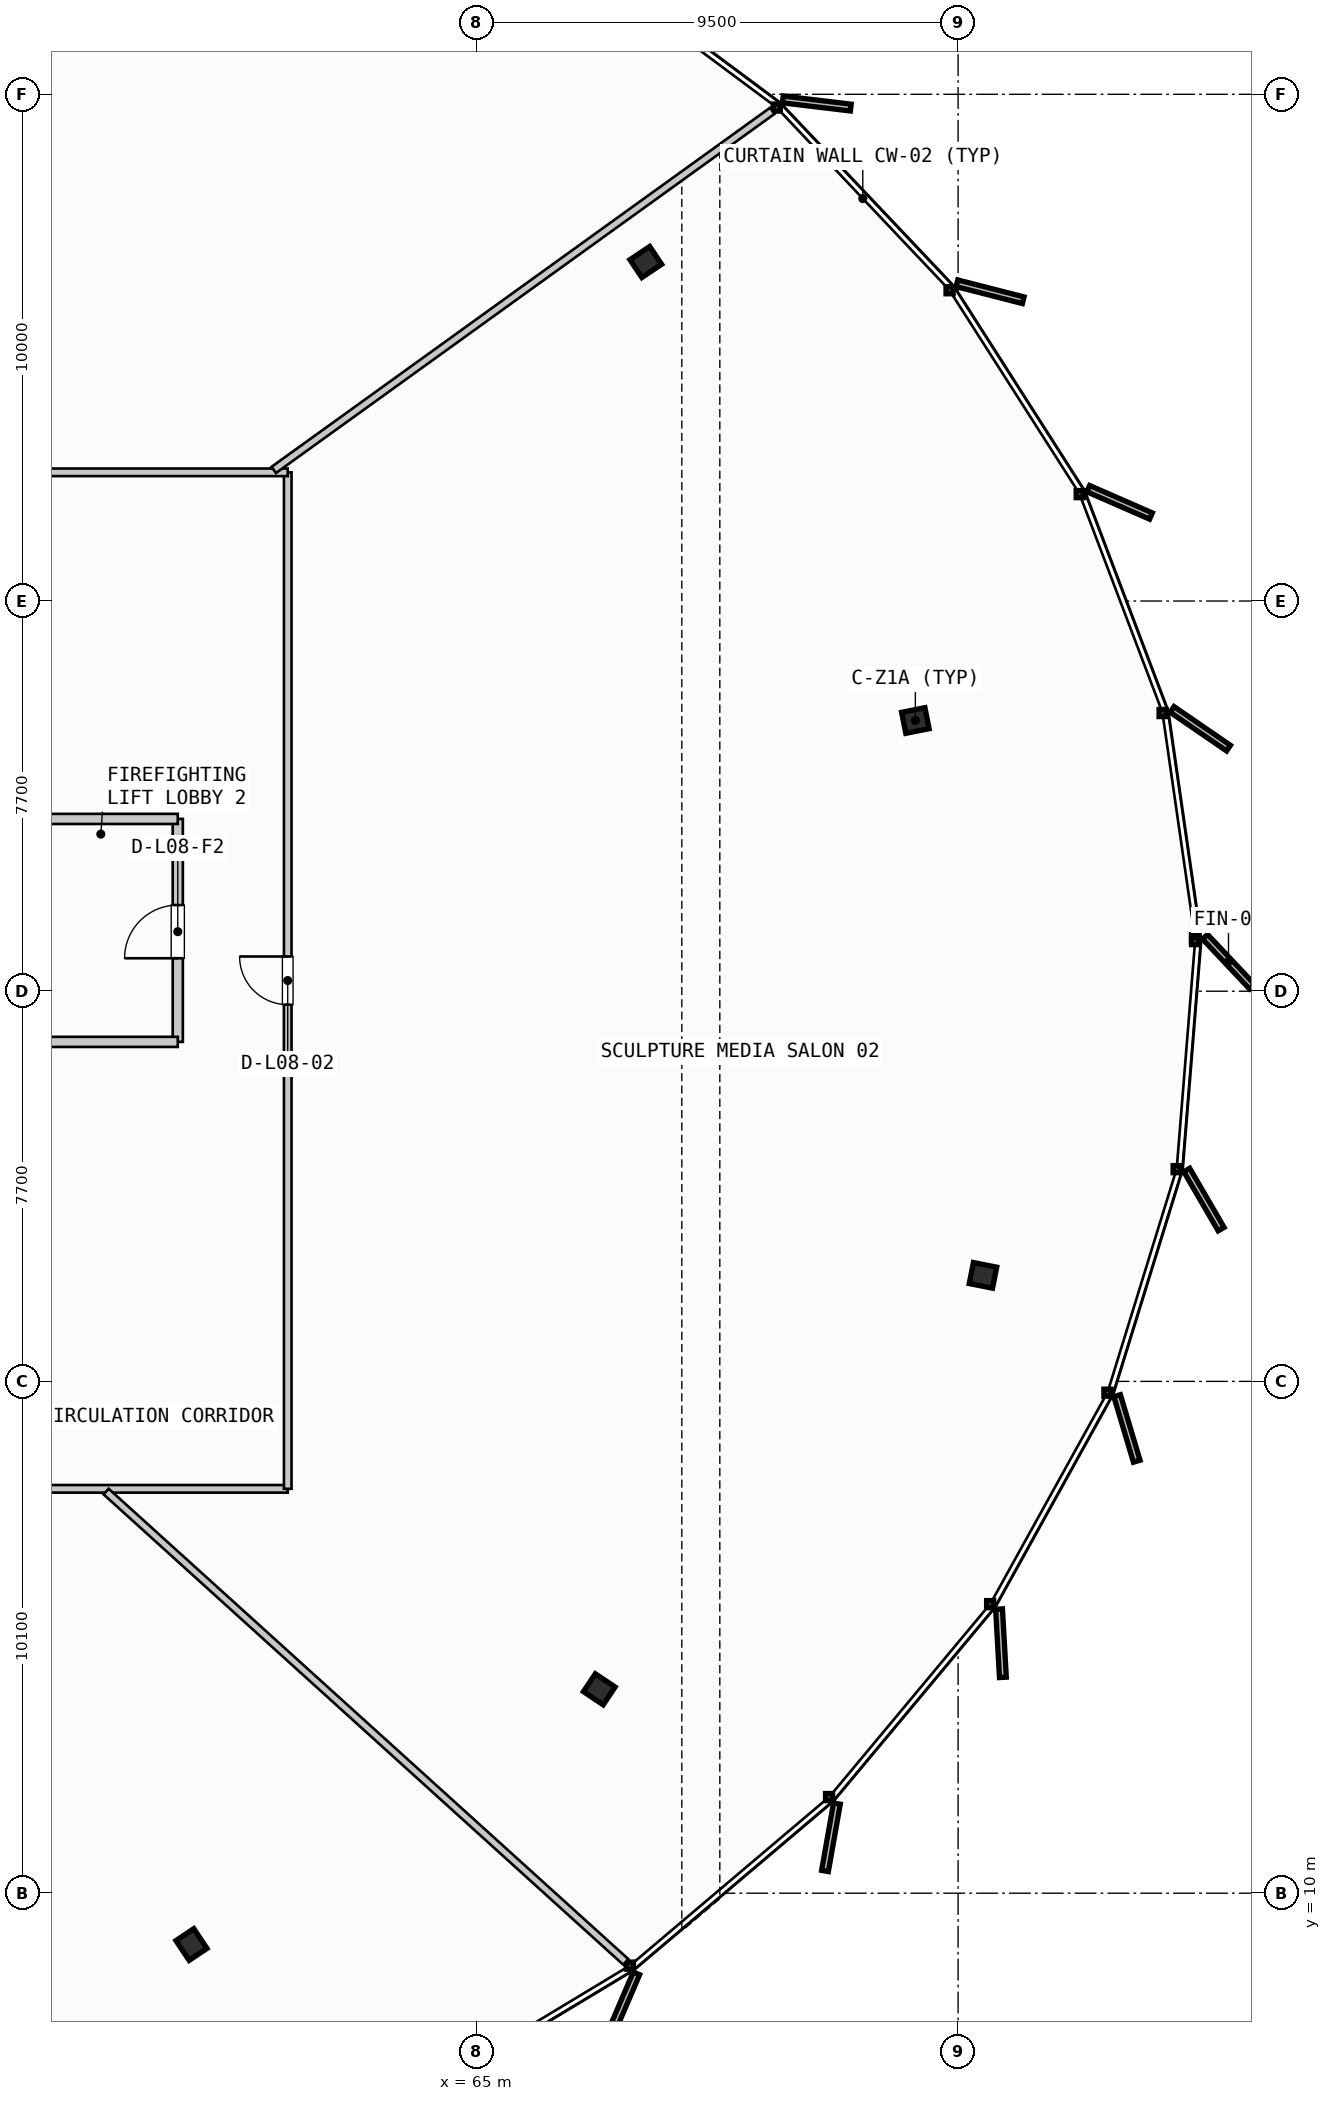
"""IFC4 building model, lengths in metres.
Left out: names, types, materials, properties, quantities, classifications, styles, units other than length and angle.
Written with IfcOpenShell. Run it as: python <this file> out.ifc"""

import sys

from ifc_helpers import new_model, si_unit, direction, frame, frame_2d, origin, origin_2d, place, context, subcontext, project, spatial, rectangle, i_section, extrude, source, transform, mapped, element, fill, save


model = new_model("IFC4")
c1 = context("Model", 3, precision=1e-05, world=origin(), true_north=direction((0.0, 1.0)))
c2 = subcontext(c1, "Body", "Model", "MODEL_VIEW")
j1 = project(units=[si_unit("LENGTHUNIT", "METRE"), si_unit("PLANEANGLEUNIT", "RADIAN")], contexts=[c1])
p1 = place(None, origin())
s1 = spatial("IfcSite", under=j1, at=p1, CompositionType="ELEMENT")
p2 = place(p1, origin())
s2 = spatial("IfcBuilding", under=s1, at=p2, CompositionType="ELEMENT")
p3 = place(p2, frame((0.0, 0.0, 37.2)))
s3 = spatial("IfcBuildingStorey", under=s2, at=p3, CompositionType="ELEMENT", Elevation=37.2)
m1 = source(origin(), c2, "Body", "SweptSolid", [
    extrude(i_section(OverallWidth=0.423, OverallDepth=0.469, WebThickness=0.051, FlangeThickness=0.081, FilletRadius=0.015, at=origin_2d()), origin(), (0.0, 0.0, 1.0), 3.55),
])
for number, where, z_axis, x_axis in (
    (1, (73.657, 33.142, 0.0), (0.0, 0.0, 1.0), (0.981, 0.195, 0.0)),
    (2, (68.336, 42.19, 0.0), (0.0, 0.0, 1.0), (0.831, 0.556, 0.0)),
    (3, (59.37, 8.987, 0.0), (0.0, 0.0, 1.0), (0.556, -0.831, 0.0)),
    (4, (67.418, 14.023, 0.0), (0.0, 0.0, 1.0), (0.831, -0.556, 0.0)),
    (5, (74.991, 22.192, 0.0), (0.0, 0.0, 1.0), (0.981, -0.195, 0.0)),
):
    element("IfcColumn", number, at=place(p3, frame(where, z_axis=z_axis, x_axis=x_axis)), inside=s3, PredefinedType="COLUMN", context=c2, shape_type="MappedRepresentation", body=[
        mapped(m1, transform((0.0, 0.0, 0.0), scale=1.0)),
    ])
p4 = place(p3, frame((59.1, 26.8, 0.0), z_axis=(0.0, 0.0, 1.0), x_axis=(0.0, 1.0, 0.0)))
e6 = element("IfcWall", 6, at=p4, inside=s3, PredefinedType="PARTITIONING", context=c2, shape_type="SweptSolid", body=[
    extrude(rectangle(XDim=4.4, YDim=0.2, at=frame_2d((2.2, 0.0))), origin(), (0.0, 0.0, 1.0), 2.925),
])
p5 = place(p4, frame((1.65, 0.0, 0.0)))
e7 = element("IfcOpeningElement", 7, at=p5, cuts=e6, PredefinedType="OPENING", context=c2, shape_type="SweptSolid", body=[
    extrude(rectangle(XDim=1.05, YDim=2.15, at=frame_2d((0.525, 1.075))), frame((0.0, 0.11, 0.0), z_axis=(0.0, -1.0, 0.0), x_axis=(1.0, 0.0, 0.0)), (0.0, 0.0, 1.0), 0.22),
])
for number, where, z_axis, x_axis in (
    (8, (55.96, 26.8, 0.0), (0.0, 0.0, 1.0), (1.0, 0.0, 0.0)),
    (9, (55.96, 31.2, 0.0), (0.0, 0.0, 1.0), (1.0, 0.0, 0.0)),
):
    element("IfcWall", number, at=place(p3, frame(where, z_axis=z_axis, x_axis=x_axis)), inside=s3, PredefinedType="PARTITIONING", context=c2, shape_type="SweptSolid", body=[
        extrude(rectangle(XDim=3.14, YDim=0.2, at=frame_2d((1.57, 0.0))), origin(), (0.0, 0.0, 1.0), 2.925),
    ])
p6 = place(p3, frame((32.85, 17.98, 0.0), z_axis=(0.0, 0.0, 1.0), x_axis=(1.0, 0.0, 0.0)))
e10 = element("IfcWall", 10, at=p6, inside=s3, PredefinedType="PARTITIONING", context=c2, shape_type="SweptSolid", body=[
    extrude(rectangle(XDim=28.42, YDim=0.15, at=frame_2d((14.21, 0.0))), origin(), (0.0, 0.0, 1.0), 2.925),
])
p7 = place(p6, frame((12.271, 0.0, 0.0)))
e11 = element("IfcOpeningElement", 11, at=p7, cuts=e10, PredefinedType="OPENING", context=c2, shape_type="SweptSolid", body=[
    extrude(rectangle(XDim=0.95, YDim=2.15, at=frame_2d((0.475, 1.075))), frame((0.0, 0.085, 0.0), z_axis=(0.0, -1.0, 0.0), x_axis=(1.0, 0.0, 0.0)), (0.0, 0.0, 1.0), 0.17),
])
p8 = place(p3, frame((61.27, 17.98, 0.0), z_axis=(0.0, 0.0, 1.0), x_axis=(0.0, 1.0, 0.0)))
e12 = element("IfcWall", 12, at=p8, inside=s3, PredefinedType="PARTITIONING", context=c2, shape_type="SweptSolid", body=[
    extrude(rectangle(XDim=20.06, YDim=0.15, at=frame_2d((10.03, 0.0))), origin(), (0.0, 0.0, 1.0), 2.925),
])
p9 = place(p8, frame((9.555, 0.0, 0.0)))
e13 = element("IfcOpeningElement", 13, at=p9, cuts=e12, PredefinedType="OPENING", context=c2, shape_type="SweptSolid", body=[
    extrude(rectangle(XDim=0.95, YDim=2.15, at=frame_2d((0.475, 1.075))), frame((0.0, 0.085, 0.0), z_axis=(0.0, -1.0, 0.0), x_axis=(1.0, 0.0, 0.0)), (0.0, 0.0, 1.0), 0.17),
])
p10 = place(p3, frame((61.27, 38.04, 0.0), z_axis=(0.0, 0.0, 1.0), x_axis=(-1.0, 0.0, 0.0)))
e14 = element("IfcWall", 14, at=p10, inside=s3, PredefinedType="PARTITIONING", context=c2, shape_type="SweptSolid", body=[
    extrude(rectangle(XDim=28.42, YDim=0.15, at=frame_2d((14.21, 0.0))), origin(), (0.0, 0.0, 1.0), 2.925),
])
p11 = place(p10, frame((12.698, 0.0, 0.0)))
e15 = element("IfcOpeningElement", 15, at=p11, cuts=e14, PredefinedType="OPENING", context=c2, shape_type="SweptSolid", body=[
    extrude(rectangle(XDim=0.95, YDim=2.15, at=frame_2d((0.475, 1.075))), frame((0.0, 0.085, 0.0), z_axis=(0.0, -1.0, 0.0), x_axis=(1.0, 0.0, 0.0)), (0.0, 0.0, 1.0), 0.17),
])
p12 = place(p3, frame((57.686, 17.926, 0.0), z_axis=(0.0, 0.0, 1.0), x_axis=(0.741441271634, -0.67101776483, 0.0)))
e16 = element("IfcWall", 16, at=p12, inside=s3, PredefinedType="PARTITIONING", context=c2, shape_type="SweptSolid", body=[
    extrude(rectangle(XDim=13.832, YDim=0.15, at=frame_2d((6.916, 0.0))), origin(), (0.0, 0.0, 1.0), 2.925),
])
p13 = place(p3, frame((60.994, 38.087, 0.0), z_axis=(0.0, 0.0, 1.0), x_axis=(0.811422427455, 0.584460130567, 0.0)))
e17 = element("IfcWall", 17, at=p13, inside=s3, PredefinedType="PARTITIONING", context=c2, shape_type="SweptSolid", body=[
    extrude(rectangle(XDim=12.125, YDim=0.15, at=frame_2d((6.062, 0.0))), origin(), (0.0, 0.0, 1.0), 2.925),
])
m2 = source(origin(), c2, "Body", "SweptSolid", [
    extrude(rectangle(XDim=1.05, YDim=2.15, at=frame_2d((0.525, 1.075))), frame((0.0, 0.025, 0.0), z_axis=(0.0, -1.0, 0.0), x_axis=(1.0, 0.0, 0.0)), (0.0, 0.0, 1.0), 0.05),
])
p14 = place(p5, origin())
e18 = element("IfcDoor", 18, at=p14, inside=s3, OperationType="SINGLE_SWING_LEFT", PredefinedType="DOOR", context=c2, shape_type="MappedRepresentation", body=[
    mapped(m2, transform((0.0, 0.0, 0.0), scale=1.0)),
])
fill(e7, e18)
m3 = source(origin(), c2, "Body", "SweptSolid", [
    extrude(rectangle(XDim=0.95, YDim=2.15, at=frame_2d((0.475, 1.075))), frame((0.0, 0.025, 0.0), z_axis=(0.0, -1.0, 0.0), x_axis=(1.0, 0.0, 0.0)), (0.0, 0.0, 1.0), 0.05),
])
p15 = place(p9, origin())
e19 = element("IfcDoor", 19, at=p15, inside=s3, OperationType="SINGLE_SWING_RIGHT", PredefinedType="DOOR", context=c2, shape_type="MappedRepresentation", body=[
    mapped(m3, transform((0.0, 0.0, 0.0), scale=1.0)),
])
fill(e13, e19)
save(model, sys.argv[1])
